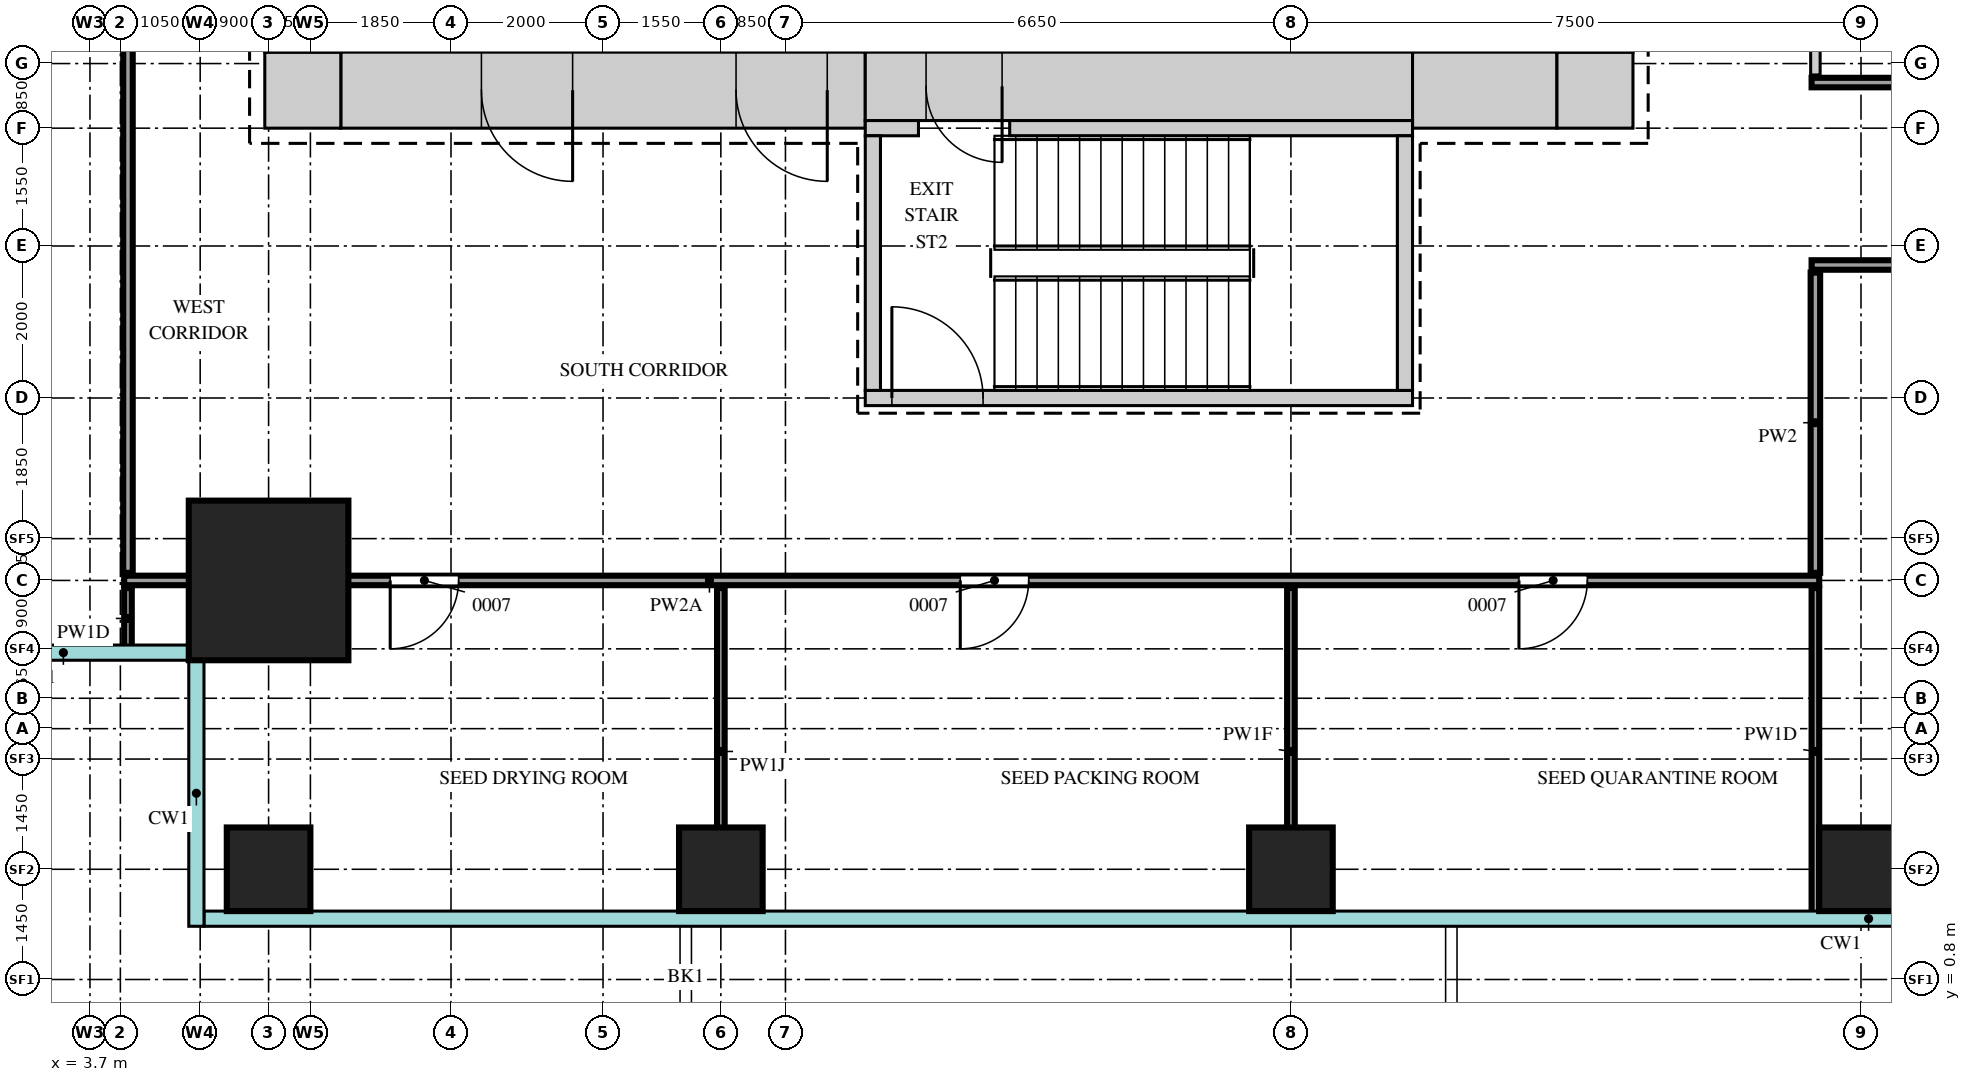
"""IFC4 building model, lengths in metres.
Left out: names, types, materials, properties, quantities, classifications, styles, units other than length and angle.
Written with IfcOpenShell. Run it as: python <this file> out.ifc"""

import sys

from ifc_helpers import new_model, si_unit, direction, frame, frame_2d, origin, origin_2d, place, context, subcontext, project, spatial, rectangle, extrude, source, transform, mapped, element, fill, save


model = new_model("IFC4")
c1 = context("Model", 3, precision=1e-05, world=origin(), true_north=direction((0.0, 1.0)))
c2 = subcontext(c1, "Body", "Model", "MODEL_VIEW")
j1 = project(units=[si_unit("LENGTHUNIT", "METRE"), si_unit("PLANEANGLEUNIT", "RADIAN")], contexts=[c1])
p1 = place(None, origin())
s1 = spatial("IfcSite", under=j1, at=p1, CompositionType="ELEMENT")
p2 = place(p1, origin())
s2 = spatial("IfcBuilding", under=s1, at=p2, CompositionType="ELEMENT")
p3 = place(p2, frame((0.0, 0.0, 110.3)))
s3 = spatial("IfcBuildingStorey", under=s2, at=p3, CompositionType="ELEMENT", Elevation=110.3)
m1 = source(origin(), c2, "Body", "SweptSolid", [
    extrude(rectangle(XDim=6.9, YDim=1.0, at=frame_2d((3.45, 0.0))), origin(), (0.0, 0.0, 1.0), 4.1),
])
p4 = place(p3, frame((7.0, 12.5, 0.0), z_axis=(0.0, 0.0, 1.0), x_axis=(1.0, 0.0, 0.0)))
e1 = element("IfcWall", 1, at=p4, inside=s3, PredefinedType="SHEAR", context=c2, shape_type="MappedRepresentation", body=[
    mapped(m1, transform((0.0, 0.0, 0.0))),
])
m2 = source(origin(), c2, "Body", "SweptSolid", [
    extrude(rectangle(XDim=1.2, YDim=2.1, at=frame_2d((0.6, 1.05))), frame((0.0, 0.51, 0.0), z_axis=(0.0, -1.0, 0.0), x_axis=(1.0, 0.0, 0.0)), (0.0, 0.0, 1.0), 1.02),
])
p5 = place(p4, frame((5.2, 0.0, 0.0)))
e2 = element("IfcOpeningElement", 2, at=p5, cuts=e1, PredefinedType="OPENING", context=c2, shape_type="MappedRepresentation", body=[
    mapped(m2, transform((0.0, 0.0, 0.0))),
])
p6 = place(p4, frame((1.85, 0.0, 0.0)))
e3 = element("IfcOpeningElement", 3, at=p6, cuts=e1, PredefinedType="OPENING", context=c2, shape_type="MappedRepresentation", body=[
    mapped(m2, transform((0.0, 0.0, 0.0))),
])
m3 = source(origin(), c2, "Body", "SweptSolid", [
    extrude(rectangle(XDim=7.2, YDim=0.9, at=frame_2d((3.6, 0.0))), origin(), (0.0, 0.0, 1.0), 4.1),
])
p7 = place(p3, frame((13.9, 12.55, 0.0), z_axis=(0.0, 0.0, 1.0), x_axis=(1.0, 0.0, 0.0)))
e4 = element("IfcWall", 4, at=p7, inside=s3, PredefinedType="SHEAR", context=c2, shape_type="MappedRepresentation", body=[
    mapped(m3, transform((0.0, 0.0, 0.0))),
])
m4 = source(origin(), c2, "Body", "SweptSolid", [
    extrude(rectangle(XDim=1.0, YDim=2.1, at=frame_2d((0.5, 1.05))), frame((0.0, 0.46, 0.0), z_axis=(0.0, -1.0, 0.0), x_axis=(1.0, 0.0, 0.0)), (0.0, 0.0, 1.0), 0.92),
])
p8 = place(p7, frame((0.8, 0.0, 0.0)))
e5 = element("IfcOpeningElement", 5, at=p8, cuts=e4, PredefinedType="OPENING", context=c2, shape_type="MappedRepresentation", body=[
    mapped(m4, transform((0.0, 0.0, 0.0))),
])
m5 = source(origin(), c2, "Body", "SweptSolid", [
    extrude(rectangle(XDim=1.9, YDim=1.0, at=frame_2d((0.95, 0.0))), origin(), (0.0, 0.0, 1.0), 4.1),
])
p9 = place(p3, frame((21.1, 12.5, 0.0), z_axis=(0.0, 0.0, 1.0), x_axis=(1.0, 0.0, 0.0)))
e6 = element("IfcWall", 6, at=p9, inside=s3, PredefinedType="SHEAR", context=c2, shape_type="MappedRepresentation", body=[
    mapped(m5, transform((0.0, 0.0, 0.0))),
])
m6 = source(origin(), c2, "Body", "SweptSolid", [
    extrude(rectangle(XDim=1.0, YDim=1.0, at=frame_2d((0.5, 0.0))), origin(), (0.0, 0.0, 1.0), 4.1),
])
for number, where, z_axis, x_axis in (
    (7, (23.0, 12.5, 0.0), (0.0, 0.0, 1.0), (1.0, 0.0, 0.0)),
    (8, (6.0, 12.5, 0.0), (0.0, 0.0, 1.0), (1.0, 0.0, 0.0)),
):
    element("IfcWall", number, at=place(p3, frame(where, z_axis=z_axis, x_axis=x_axis)), inside=s3, PredefinedType="SHEAR", context=c2, shape_type="MappedRepresentation", body=[
        mapped(m6, transform((0.0, 0.0, 0.0))),
    ])
m7 = source(origin(), c2, "Body", "SweptSolid", [
    extrude(rectangle(XDim=0.7, YDim=0.2, at=frame_2d((0.35, 0.0))), origin(), (0.0, 0.0, 1.0), 4.1),
])
p10 = place(p3, frame((13.9, 12.0, 0.0), z_axis=(0.0, 0.0, 1.0), x_axis=(1.0, 0.0, 0.0)))
e9 = element("IfcWall", 9, at=p10, inside=s3, PredefinedType="SHEAR", context=c2, shape_type="MappedRepresentation", body=[
    mapped(m7, transform((0.0, 0.0, 0.0))),
])
m8 = source(origin(), c2, "Body", "SweptSolid", [
    extrude(rectangle(XDim=5.3, YDim=0.2, at=frame_2d((2.65, 0.0))), origin(), (0.0, 0.0, 1.0), 4.1),
])
p11 = place(p3, frame((15.8, 12.0, 0.0), z_axis=(0.0, 0.0, 1.0), x_axis=(1.0, 0.0, 0.0)))
e10 = element("IfcWall", 10, at=p11, inside=s3, PredefinedType="SHEAR", context=c2, shape_type="MappedRepresentation", body=[
    mapped(m8, transform((0.0, 0.0, 0.0))),
])
m9 = source(origin(), c2, "Body", "SweptSolid", [
    extrude(rectangle(XDim=7.2, YDim=0.2, at=frame_2d((3.6, 0.0))), origin(), (0.0, 0.0, 1.0), 4.1),
])
p12 = place(p3, frame((13.9, 8.45, 0.0), z_axis=(0.0, 0.0, 1.0), x_axis=(1.0, 0.0, 0.0)))
e11 = element("IfcWall", 11, at=p12, inside=s3, PredefinedType="SHEAR", context=c2, shape_type="MappedRepresentation", body=[
    mapped(m9, transform((0.0, 0.0, 0.0))),
])
m10 = source(origin(), c2, "Body", "SweptSolid", [
    extrude(rectangle(XDim=1.2, YDim=2.1, at=frame_2d((0.6, 1.05))), frame((0.0, 0.11, 0.0), z_axis=(0.0, -1.0, 0.0), x_axis=(1.0, 0.0, 0.0)), (0.0, 0.0, 1.0), 0.22),
])
p13 = place(p12, frame((0.35, 0.0, 0.0)))
e12 = element("IfcOpeningElement", 12, at=p13, cuts=e11, PredefinedType="OPENING", context=c2, shape_type="MappedRepresentation", body=[
    mapped(m10, transform((0.0, 0.0, 0.0))),
])
m11 = source(origin(), c2, "Body", "SweptSolid", [
    extrude(rectangle(XDim=3.35, YDim=0.2, at=frame_2d((1.675, 0.0))), origin(), (0.0, 0.0, 1.0), 4.1),
])
for number, where, z_axis, x_axis in (
    (13, (21.0, 8.55, 0.0), (0.0, 0.0, 1.0), (0.0, 1.0, 0.0)),
    (14, (14.0, 8.55, 0.0), (0.0, 0.0, 1.0), (0.0, 1.0, 0.0)),
):
    element("IfcWall", number, at=place(p3, frame(where, z_axis=z_axis, x_axis=x_axis)), inside=s3, PredefinedType="SHEAR", context=c2, shape_type="MappedRepresentation", body=[
        mapped(m11, transform((0.0, 0.0, 0.0))),
    ])
m12 = source(origin(), c2, "Body", "SweptSolid", [
    extrude(rectangle(XDim=2.1, YDim=2.1, at=origin_2d()), origin(), (0.0, 0.0, 1.0), 4.4),
])
p14 = place(p3, frame((6.05, 6.05, 0.0), z_axis=(0.0, 0.0, 1.0), x_axis=(1.0, 0.0, 0.0)))
e15 = element("IfcColumn", 15, at=p14, inside=s3, PredefinedType="COLUMN", context=c2, shape_type="MappedRepresentation", body=[
    mapped(m12, transform((0.0, 0.0, 0.0))),
])
m13 = source(origin(), c2, "Body", "SweptSolid", [
    extrude(rectangle(XDim=1.1, YDim=1.1, at=origin_2d()), origin(), (0.0, 0.0, 1.0), 4.1),
])
for number, where, z_axis, x_axis in (
    (16, (6.05, 2.25, 0.0), (0.0, 0.0, 1.0), (1.0, 0.0, 0.0)),
    (17, (12.0, 2.25, 0.0), (0.0, 0.0, 1.0), (1.0, 0.0, 0.0)),
    (18, (19.5, 2.25, 0.0), (0.0, 0.0, 1.0), (1.0, 0.0, 0.0)),
    (19, (27.0, 2.25, 0.0), (0.0, 0.0, 1.0), (1.0, 0.0, 0.0)),
):
    element("IfcColumn", number, at=place(p3, frame(where, z_axis=z_axis, x_axis=x_axis)), inside=s3, PredefinedType="COLUMN", context=c2, shape_type="MappedRepresentation", body=[
        mapped(m13, transform((0.0, 0.0, 0.0))),
    ])
m14 = source(origin(), c2, "Body", "SweptSolid", [
    extrude(rectangle(XDim=4.3, YDim=0.1, at=frame_2d((2.15, 0.0))), origin(), (0.0, 0.0, 1.0), 3.65),
])
p15 = place(p3, frame((12.0, 1.65, 0.0), z_axis=(0.0, 0.0, 1.0), x_axis=(0.0, 1.0, 0.0)))
e20 = element("IfcWall", 20, at=p15, inside=s3, PredefinedType="PARTITIONING", context=c2, shape_type="MappedRepresentation", body=[
    mapped(m14, transform((0.0, 0.0, 0.0))),
])
m15 = source(origin(), c2, "Body", "SweptSolid", [
    extrude(rectangle(XDim=4.3, YDim=0.1, at=frame_2d((2.15, 0.0))), origin(), (0.0, 0.0, 1.0), 3.77),
])
p16 = place(p3, frame((19.5, 1.65, 0.0), z_axis=(0.0, 0.0, 1.0), x_axis=(0.0, 1.0, 0.0)))
e21 = element("IfcWall", 21, at=p16, inside=s3, PredefinedType="PARTITIONING", context=c2, shape_type="MappedRepresentation", body=[
    mapped(m15, transform((0.0, 0.0, 0.0))),
])
m16 = source(origin(), c2, "Body", "SweptSolid", [
    extrude(rectangle(XDim=4.3, YDim=0.1, at=frame_2d((2.15, 0.0))), origin(), (0.0, 0.0, 1.0), 4.2),
])
p17 = place(p3, frame((26.4, 1.65, 0.0), z_axis=(0.0, 0.0, 1.0), x_axis=(0.0, 1.0, 0.0)))
e22 = element("IfcWall", 22, at=p17, inside=s3, PredefinedType="PARTITIONING", context=c2, shape_type="MappedRepresentation", body=[
    mapped(m16, transform((0.0, 0.0, 0.0))),
])
m17 = source(origin(), c2, "Body", "SweptSolid", [
    extrude(rectangle(XDim=0.8, YDim=0.1, at=frame_2d((0.4, 0.0))), origin(), (0.0, 0.0, 1.0), 4.2),
])
p18 = place(p3, frame((4.2, 5.15, 0.0), z_axis=(0.0, 0.0, 1.0), x_axis=(0.0, 1.0, 0.0)))
e23 = element("IfcWall", 23, at=p18, inside=s3, PredefinedType="PARTITIONING", context=c2, shape_type="MappedRepresentation", body=[
    mapped(m17, transform((0.0, 0.0, 0.0))),
])
m18 = source(origin(), c2, "Body", "SweptSolid", [
    extrude(rectangle(XDim=22.3, YDim=0.125, at=frame_2d((11.15, 0.0))), origin(), (0.0, 0.0, 1.0), 3.55),
])
p19 = place(p3, frame((4.15, 6.05, 0.0), z_axis=(0.0, 0.0, 1.0), x_axis=(1.0, 0.0, 0.0)))
e24 = element("IfcWall", 24, at=p19, inside=s3, PredefinedType="PARTITIONING", context=c2, shape_type="MappedRepresentation", body=[
    mapped(m18, transform((0.0, 0.0, 0.0))),
])
m19 = source(origin(), c2, "Body", "SweptSolid", [
    extrude(rectangle(XDim=0.9, YDim=2.1, at=frame_2d((0.45, 1.05))), frame((0.0, 0.073, 0.0), z_axis=(0.0, -1.0, 0.0), x_axis=(1.0, 0.0, 0.0)), (0.0, 0.0, 1.0), 0.145),
])
p20 = place(p19, frame((3.5, 0.0, 0.0)))
e25 = element("IfcOpeningElement", 25, at=p20, cuts=e24, PredefinedType="OPENING", context=c2, shape_type="MappedRepresentation", body=[
    mapped(m19, transform((0.0, 0.0, 0.0))),
])
p21 = place(p19, frame((11.0, 0.0, 0.0)))
e26 = element("IfcOpeningElement", 26, at=p21, cuts=e24, PredefinedType="OPENING", context=c2, shape_type="MappedRepresentation", body=[
    mapped(m19, transform((0.0, 0.0, 0.0))),
])
p22 = place(p19, frame((18.35, 0.0, 0.0)))
e27 = element("IfcOpeningElement", 27, at=p22, cuts=e24, PredefinedType="OPENING", context=c2, shape_type="MappedRepresentation", body=[
    mapped(m19, transform((0.0, 0.0, 0.0))),
])
m20 = source(origin(), c2, "Body", "SweptSolid", [
    extrude(rectangle(XDim=41.8, YDim=0.125, at=frame_2d((20.9, 0.0))), origin(), (0.0, 0.0, 1.0), 4.2),
])
p23 = place(p3, frame((4.2, 6.15, 0.0), z_axis=(0.0, 0.0, 1.0), x_axis=(0.0, 1.0, 0.0)))
e28 = element("IfcWall", 28, at=p23, inside=s3, PredefinedType="PARTITIONING", context=c2, shape_type="MappedRepresentation", body=[
    mapped(m20, transform((0.0, 0.0, 0.0))),
])
p24 = place(p23, frame((7.2, 0.0, 0.0)))
e29 = element("IfcOpeningElement", 29, at=p24, cuts=e28, PredefinedType="OPENING", context=c2, shape_type="MappedRepresentation", body=[
    mapped(m19, transform((0.0, 0.0, 0.0))),
])
p25 = place(p23, frame((21.8, 0.0, 0.0)))
e30 = element("IfcOpeningElement", 30, at=p25, cuts=e28, PredefinedType="OPENING", context=c2, shape_type="MappedRepresentation", body=[
    mapped(m19, transform((0.0, 0.0, 0.0))),
])
p26 = place(p23, frame((33.3, 0.0, 0.0)))
e31 = element("IfcOpeningElement", 31, at=p26, cuts=e28, PredefinedType="OPENING", context=c2, shape_type="MappedRepresentation", body=[
    mapped(m19, transform((0.0, 0.0, 0.0))),
])
m21 = source(origin(), c2, "Body", "SweptSolid", [
    extrude(rectangle(XDim=3.95, YDim=0.125, at=frame_2d((1.975, 0.0))), origin(), (0.0, 0.0, 1.0), 4.2),
])
p27 = place(p3, frame((26.4, 6.15, 0.0), z_axis=(0.0, 0.0, 1.0), x_axis=(0.0, 1.0, 0.0)))
e32 = element("IfcWall", 32, at=p27, inside=s3, PredefinedType="PARTITIONING", context=c2, shape_type="MappedRepresentation", body=[
    mapped(m21, transform((0.0, 0.0, 0.0))),
])
m22 = source(origin(), c2, "Body", "SweptSolid", [
    extrude(rectangle(XDim=20.0, YDim=0.125, at=frame_2d((10.0, 0.0))), origin(), (0.0, 0.0, 1.0), 4.2),
])
p28 = place(p3, frame((26.35, 10.2, 0.0), z_axis=(0.0, 0.0, 1.0), x_axis=(1.0, 0.0, 0.0)))
e33 = element("IfcWall", 33, at=p28, inside=s3, PredefinedType="PARTITIONING", context=c2, shape_type="MappedRepresentation", body=[
    mapped(m22, transform((0.0, 0.0, 0.0))),
])
p29 = place(p28, frame((3.8, 0.0, 0.0)))
e34 = element("IfcOpeningElement", 34, at=p29, cuts=e33, PredefinedType="OPENING", context=c2, shape_type="MappedRepresentation", body=[
    mapped(m19, transform((0.0, 0.0, 0.0))),
])
p30 = place(p28, frame((11.3, 0.0, 0.0)))
e35 = element("IfcOpeningElement", 35, at=p30, cuts=e33, PredefinedType="OPENING", context=c2, shape_type="MappedRepresentation", body=[
    mapped(m19, transform((0.0, 0.0, 0.0))),
])
m23 = source(origin(), c2, "Body", "SweptSolid", [
    extrude(rectangle(XDim=1.2, YDim=2.1, at=frame_2d((0.6, 1.05))), frame((0.0, 0.073, 0.0), z_axis=(0.0, -1.0, 0.0), x_axis=(1.0, 0.0, 0.0)), (0.0, 0.0, 1.0), 0.145),
])
p31 = place(p28, frame((18.4, 0.0, 0.0)))
e36 = element("IfcOpeningElement", 36, at=p31, cuts=e33, PredefinedType="OPENING", context=c2, shape_type="MappedRepresentation", body=[
    mapped(m23, transform((0.0, 0.0, 0.0))),
])
m24 = source(origin(), c2, "Body", "SweptSolid", [
    extrude(rectangle(XDim=17.7, YDim=0.125, at=frame_2d((8.85, 0.0))), origin(), (0.0, 0.0, 1.0), 4.2),
])
p32 = place(p3, frame((26.35, 12.6, 0.0), z_axis=(0.0, 0.0, 1.0), x_axis=(1.0, 0.0, 0.0)))
e37 = element("IfcWall", 37, at=p32, inside=s3, PredefinedType="PARTITIONING", context=c2, shape_type="MappedRepresentation", body=[
    mapped(m24, transform((0.0, 0.0, 0.0))),
])
m25 = source(origin(), c2, "Body", "SweptSolid", [
    extrude(rectangle(XDim=23.2, YDim=0.125, at=frame_2d((11.6, 0.0))), origin(), (0.0, 0.0, 1.0), 4.2),
])
p33 = place(p3, frame((26.4, 12.7, 0.0), z_axis=(0.0, 0.0, 1.0), x_axis=(0.0, 1.0, 0.0)))
e38 = element("IfcWall", 38, at=p33, inside=s3, PredefinedType="PARTITIONING", context=c2, shape_type="MappedRepresentation", body=[
    mapped(m25, transform((0.0, 0.0, 0.0))),
])
p34 = place(p33, frame((2.15, 0.0, 0.0)))
e39 = element("IfcOpeningElement", 39, at=p34, cuts=e38, PredefinedType="OPENING", context=c2, shape_type="MappedRepresentation", body=[
    mapped(m19, transform((0.0, 0.0, 0.0))),
])
p35 = place(p33, frame((18.2, 0.0, 0.0)))
e40 = element("IfcOpeningElement", 40, at=p35, cuts=e38, PredefinedType="OPENING", context=c2, shape_type="MappedRepresentation", body=[
    mapped(m23, transform((0.0, 0.0, 0.0))),
])
m26 = source(origin(), c2, "Body", "SweptSolid", [
    extrude(rectangle(XDim=1.2, YDim=2.1, at=frame_2d((0.6, 1.05))), frame((0.0, 0.45, 0.0), z_axis=(0.0, -1.0, 0.0), x_axis=(1.0, 0.0, 0.0)), (0.0, 0.0, 1.0), 0.9),
])
p36 = place(p5, origin())
e41 = element("IfcDoor", 41, at=p36, inside=s3, OperationType="SINGLE_SWING_RIGHT", PredefinedType="DOOR", context=c2, shape_type="MappedRepresentation", body=[
    mapped(m26, transform((0.0, 0.0, 0.0))),
])
fill(e2, e41)
p37 = place(p6, origin())
e42 = element("IfcDoor", 42, at=p37, inside=s3, OperationType="SINGLE_SWING_RIGHT", PredefinedType="DOOR", context=c2, shape_type="MappedRepresentation", body=[
    mapped(m26, transform((0.0, 0.0, 0.0))),
])
fill(e3, e42)
m27 = source(origin(), c2, "Body", "SweptSolid", [
    extrude(rectangle(XDim=1.0, YDim=2.1, at=frame_2d((0.5, 1.05))), frame((0.0, 0.4, 0.0), z_axis=(0.0, -1.0, 0.0), x_axis=(1.0, 0.0, 0.0)), (0.0, 0.0, 1.0), 0.8),
])
p38 = place(p8, origin())
e43 = element("IfcDoor", 43, at=p38, inside=s3, OperationType="SINGLE_SWING_RIGHT", PredefinedType="DOOR", context=c2, shape_type="MappedRepresentation", body=[
    mapped(m27, transform((0.0, 0.0, 0.0))),
])
fill(e5, e43)
m28 = source(origin(), c2, "Body", "SweptSolid", [
    extrude(rectangle(XDim=0.9, YDim=2.1, at=frame_2d((0.45, 1.05))), frame((0.0, 0.025, 0.0), z_axis=(0.0, -1.0, 0.0), x_axis=(1.0, 0.0, 0.0)), (0.0, 0.0, 1.0), 0.05),
])
p39 = place(p20, origin())
e44 = element("IfcDoor", 44, at=p39, inside=s3, OperationType="SINGLE_SWING_LEFT", PredefinedType="DOOR", context=c2, shape_type="MappedRepresentation", body=[
    mapped(m28, transform((0.0, 0.0, 0.0))),
])
fill(e25, e44)
p40 = place(p21, origin())
e45 = element("IfcDoor", 45, at=p40, inside=s3, OperationType="SINGLE_SWING_LEFT", PredefinedType="DOOR", context=c2, shape_type="MappedRepresentation", body=[
    mapped(m28, transform((0.0, 0.0, 0.0))),
])
fill(e26, e45)
p41 = place(p22, origin())
e46 = element("IfcDoor", 46, at=p41, inside=s3, OperationType="SINGLE_SWING_LEFT", PredefinedType="DOOR", context=c2, shape_type="MappedRepresentation", body=[
    mapped(m28, transform((0.0, 0.0, 0.0))),
])
fill(e27, e46)
m29 = source(origin(), c2, "Body", "SweptSolid", [
    extrude(rectangle(XDim=1.2, YDim=2.1, at=frame_2d((0.6, 1.05))), frame((0.0, 0.025, 0.0), z_axis=(0.0, -1.0, 0.0), x_axis=(1.0, 0.0, 0.0)), (0.0, 0.0, 1.0), 0.05),
])
p42 = place(p13, origin())
e47 = element("IfcDoor", 47, at=p42, inside=s3, OperationType="SINGLE_SWING_RIGHT", PredefinedType="DOOR", context=c2, shape_type="MappedRepresentation", body=[
    mapped(m29, transform((0.0, 0.0, 0.0))),
])
fill(e12, e47)
save(model, sys.argv[1])
